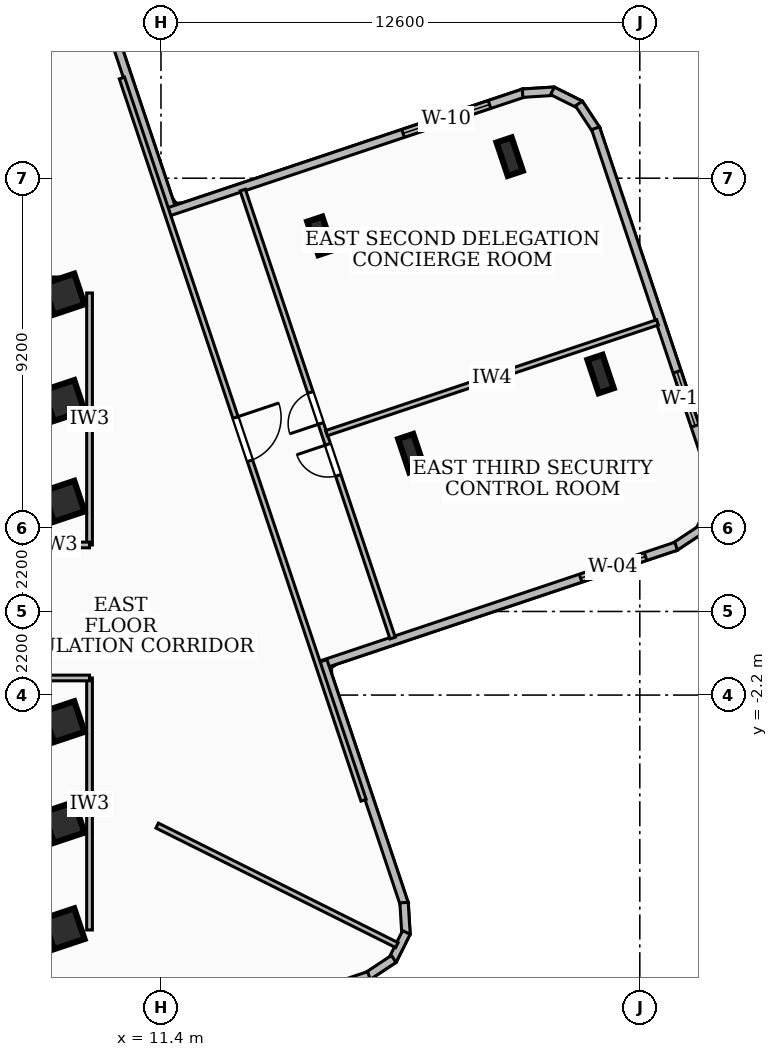
"""IFC4 building model, lengths in metres.
Left out: names, types, materials, properties, quantities, classifications, styles, units other than length and angle.
Written with IfcOpenShell. Run it as: python <this file> out.ifc"""

import sys

from ifc_helpers import new_model, si_unit, direction, frame, frame_2d, origin, origin_2d, place, context, subcontext, project, spatial, rectangle, i_section, extrude, element, fill, save


model = new_model("IFC4")
c1 = context("Model", 3, precision=1e-05, world=origin(), true_north=direction((0.0, 1.0)))
c2 = subcontext(c1, "Body", "Model", "MODEL_VIEW")
j1 = project(units=[si_unit("LENGTHUNIT", "METRE"), si_unit("PLANEANGLEUNIT", "RADIAN")], contexts=[c1])
p1 = place(None, origin())
s1 = spatial("IfcSite", under=j1, at=p1, CompositionType="ELEMENT")
p2 = place(p1, origin())
s2 = spatial("IfcBuilding", under=s1, at=p2, CompositionType="ELEMENT")
p3 = place(p2, frame((0.0, 0.0, 159.48)))
s3 = spatial("IfcBuildingStorey", under=s2, at=p3, CompositionType="ELEMENT", Elevation=159.48)
for number, where, z_axis, x_axis in (
    (1, (-8.78, 8.535, 0.0), (0.0, 0.0, 1.0), (1.0, 0.0, 0.0)),
    (2, (8.78, -8.535, 0.0), (0.0, 0.0, 1.0), (-1.0, 0.0, 0.0)),
):
    element("IfcWall", number, at=place(p3, frame(where, z_axis=z_axis, x_axis=x_axis)), inside=s3, PredefinedType="SHEAR", context=c2, shape_type="SweptSolid", body=[
        extrude(rectangle(XDim=17.56, YDim=0.45, at=frame_2d((8.78, 0.0))), origin(), (0.0, 0.0, 1.0), 3.34),
    ])
for number, where, z_axis, x_axis in (
    (3, (8.85, -5.55, 0.0), (0.0, 0.0, 1.0), (0.948, 0.317, 0.0)),
    (4, (8.85, -2.9, 0.0), (0.0, 0.0, 1.0), (0.948, 0.317, 0.0)),
    (5, (8.85, 2.9, 0.0), (0.0, 0.0, 1.0), (0.948, 0.317, 0.0)),
    (6, (8.85, 5.55, 0.0), (0.0, 0.0, 1.0), (0.948, 0.317, 0.0)),
    (7, (8.85, -8.35, 0.0), (0.0, 0.0, 1.0), (0.948, 0.317, 0.0)),
    (8, (8.85, 8.35, 0.0), (0.0, 0.0, 1.0), (0.948, 0.317, 0.0)),
):
    element("IfcColumn", number, at=place(p3, frame(where, z_axis=z_axis, x_axis=x_axis)), inside=s3, PredefinedType="COLUMN", context=c2, shape_type="SweptSolid", body=[
        extrude(rectangle(XDim=0.85, YDim=0.85, at=origin_2d()), origin(), (0.0, 0.0, 1.0), 3.6),
    ])
for number, where, z_axis, x_axis in (
    (9, (17.987, 4.164, 0.0), (0.0, 0.0, 1.0), (0.948, 0.317, 0.0)),
    (10, (15.594, 9.883, 0.0), (0.0, 0.0, 1.0), (0.948, 0.317, 0.0)),
    (11, (22.968, 6.248, 0.0), (0.0, 0.0, 1.0), (0.948, 0.317, 0.0)),
    (12, (20.576, 11.967, 0.0), (0.0, 0.0, 1.0), (0.948, 0.317, 0.0)),
):
    element("IfcColumn", number, at=place(p3, frame(where, z_axis=z_axis, x_axis=x_axis)), inside=s3, PredefinedType="COLUMN", context=c2, shape_type="SweptSolid", body=[
        extrude(i_section(OverallWidth=0.418, OverallDepth=0.927, WebThickness=0.019, FlangeThickness=0.032, at=origin_2d()), origin(), (0.0, 0.0, 1.0), 3.6),
    ])
p4 = place(p3, frame((9.581, 16.873, 0.0), z_axis=(0.0, 0.0, 1.0), x_axis=(0.317387116224, -0.94829606055, 0.0)))
e13 = element("IfcWall", 13, at=p4, inside=s3, PredefinedType="SOLIDWALL", context=c2, shape_type="SweptSolid", body=[
    extrude(rectangle(XDim=6.758, YDim=0.22, at=frame_2d((3.379, 0.0))), origin(), (0.0, 0.0, 1.0), 3.34),
])
p5 = place(p3, frame((11.615, 10.519, 0.0), z_axis=(0.0, 0.0, 1.0), x_axis=(0.948331055834, 0.317282537404, 0.0)))
e14 = element("IfcWall", 14, at=p5, inside=s3, PredefinedType="SOLIDWALL", context=c2, shape_type="SweptSolid", body=[
    extrude(rectangle(XDim=9.858, YDim=0.22, at=frame_2d((4.929, 0.0))), origin(), (0.0, 0.0, 1.0), 3.34),
])
p6 = place(p5, frame((6.49, 0.0, 0.85)))
e15 = element("IfcOpeningElement", 15, at=p6, cuts=e14, PredefinedType="OPENING", context=c2, shape_type="SweptSolid", body=[
    extrude(rectangle(XDim=2.4, YDim=1.65, at=frame_2d((1.2, 0.825))), frame((0.0, 0.12, 0.0), z_axis=(0.0, -1.0, 0.0), x_axis=(1.0, 0.0, 0.0)), (0.0, 0.0, 1.0), 0.24),
])
p7 = place(p3, frame((20.915, 13.637, 0.0), z_axis=(0.0, 0.0, 1.0), x_axis=(0.998057128569, 0.062305442082, 0.0)))
e16 = element("IfcWall", 16, at=p7, inside=s3, PredefinedType="SOLIDWALL", context=c2, shape_type="SweptSolid", body=[
    extrude(rectangle(XDim=0.835, YDim=0.22, at=frame_2d((0.417, 0.0))), origin(), (0.0, 0.0, 1.0), 3.34),
])
p8 = place(p3, frame((21.701, 13.698, 0.0), z_axis=(0.0, 0.0, 1.0), x_axis=(0.894963703084, -0.446138958356, 0.0)))
e17 = element("IfcWall", 17, at=p8, inside=s3, PredefinedType="SOLIDWALL", context=c2, shape_type="SweptSolid", body=[
    extrude(rectangle(XDim=0.818, YDim=0.22, at=frame_2d((0.409, 0.0))), origin(), (0.0, 0.0, 1.0), 3.34),
])
p9 = place(p3, frame((22.397, 13.365, 0.0), z_axis=(0.0, 0.0, 1.0), x_axis=(0.552133058206, -0.833756011094, 0.0)))
e18 = element("IfcWall", 18, at=p9, inside=s3, PredefinedType="SOLIDWALL", context=c2, shape_type="SweptSolid", body=[
    extrude(rectangle(XDim=0.835, YDim=0.22, at=frame_2d((0.417, 0.0))), origin(), (0.0, 0.0, 1.0), 3.34),
])
p10 = place(p3, frame((22.836, 12.714, 0.0), z_axis=(0.0, 0.0, 1.0), x_axis=(0.317285610931, -0.94833002752, 0.0)))
e19 = element("IfcWall", 19, at=p10, inside=s3, PredefinedType="SOLIDWALL", context=c2, shape_type="SweptSolid", body=[
    extrude(rectangle(XDim=9.622, YDim=0.22, at=frame_2d((4.811, 0.0))), origin(), (0.0, 0.0, 1.0), 3.34),
])
p11 = place(p10, frame((6.755, 0.0, 0.85)))
e20 = element("IfcOpeningElement", 20, at=p11, cuts=e19, PredefinedType="OPENING", context=c2, shape_type="SweptSolid", body=[
    extrude(rectangle(XDim=1.5, YDim=1.5, at=frame_2d((0.75, 0.75))), frame((0.0, 0.12, 0.0), z_axis=(0.0, -1.0, 0.0), x_axis=(1.0, 0.0, 0.0)), (0.0, 0.0, 1.0), 0.24),
])
p12 = place(p3, frame((25.94, 2.853, 0.0), z_axis=(0.0, 0.0, 1.0), x_axis=(-0.445781750405, -0.895141682085, 0.0)))
e21 = element("IfcWall", 21, at=p12, inside=s3, PredefinedType="SOLIDWALL", context=c2, shape_type="SweptSolid", body=[
    extrude(rectangle(XDim=0.819, YDim=0.22, at=frame_2d((0.409, 0.0))), origin(), (0.0, 0.0, 1.0), 3.34),
])
p13 = place(p3, frame((25.607, 2.156, 0.0), z_axis=(0.0, 0.0, 1.0), x_axis=(-0.833756011094, -0.552133058206, 0.0)))
e22 = element("IfcWall", 22, at=p13, inside=s3, PredefinedType="SOLIDWALL", context=c2, shape_type="SweptSolid", body=[
    extrude(rectangle(XDim=0.835, YDim=0.22, at=frame_2d((0.417, 0.0))), origin(), (0.0, 0.0, 1.0), 3.34),
])
p14 = place(p3, frame((24.956, 1.717, 0.0), z_axis=(0.0, 0.0, 1.0), x_axis=(-0.948331055834, -0.317282537404, 0.0)))
e23 = element("IfcWall", 23, at=p14, inside=s3, PredefinedType="SOLIDWALL", context=c2, shape_type="SweptSolid", body=[
    extrude(rectangle(XDim=9.858, YDim=0.22, at=frame_2d((4.929, 0.0))), origin(), (0.0, 0.0, 1.0), 3.34),
])
p15 = place(p14, frame((0.85, 0.0, 0.85)))
e24 = element("IfcOpeningElement", 24, at=p15, cuts=e23, PredefinedType="OPENING", context=c2, shape_type="SweptSolid", body=[
    extrude(rectangle(XDim=1.8, YDim=2.0, at=frame_2d((0.9, 1.0))), frame((0.0, 0.12, 0.0), z_axis=(0.0, -1.0, 0.0), x_axis=(1.0, 0.0, 0.0)), (0.0, 0.0, 1.0), 0.24),
])
p16 = place(p3, frame((15.662, -1.3, 0.0), z_axis=(0.0, 0.0, 1.0), x_axis=(0.317224676093, -0.948350412494, 0.0)))
e25 = element("IfcWall", 25, at=p16, inside=s3, PredefinedType="SOLIDWALL", context=c2, shape_type="SweptSolid", body=[
    extrude(rectangle(XDim=6.758, YDim=0.22, at=frame_2d((3.379, 0.0))), origin(), (0.0, 0.0, 1.0), 3.34),
])
p17 = place(p3, frame((17.796, -7.66, 0.0), z_axis=(0.0, 0.0, 1.0), x_axis=(0.062305442082, -0.998057128569, 0.0)))
e26 = element("IfcWall", 26, at=p17, inside=s3, PredefinedType="SOLIDWALL", context=c2, shape_type="SweptSolid", body=[
    extrude(rectangle(XDim=0.835, YDim=0.22, at=frame_2d((0.417, 0.0))), origin(), (0.0, 0.0, 1.0), 3.34),
])
p18 = place(p3, frame((17.857, -8.446, 0.0), z_axis=(0.0, 0.0, 1.0), x_axis=(-0.446258139106, -0.894904281631, 0.0)))
e27 = element("IfcWall", 27, at=p18, inside=s3, PredefinedType="SOLIDWALL", context=c2, shape_type="SweptSolid", body=[
    extrude(rectangle(XDim=0.818, YDim=0.22, at=frame_2d((0.409, 0.0))), origin(), (0.0, 0.0, 1.0), 3.34),
])
p19 = place(p3, frame((17.524, -9.142, 0.0), z_axis=(0.0, 0.0, 1.0), x_axis=(-0.833756011094, -0.552133058206, 0.0)))
e28 = element("IfcWall", 28, at=p19, inside=s3, PredefinedType="SOLIDWALL", context=c2, shape_type="SweptSolid", body=[
    extrude(rectangle(XDim=0.835, YDim=0.22, at=frame_2d((0.417, 0.0))), origin(), (0.0, 0.0, 1.0), 3.34),
])
p20 = place(p3, frame((16.873, -9.581, 0.0), z_axis=(0.0, 0.0, 1.0), x_axis=(-0.94829606055, -0.317387116224, 0.0)))
e29 = element("IfcWall", 29, at=p20, inside=s3, PredefinedType="SOLIDWALL", context=c2, shape_type="SweptSolid", body=[
    extrude(rectangle(XDim=6.758, YDim=0.22, at=frame_2d((3.379, 0.0))), origin(), (0.0, 0.0, 1.0), 3.34),
])
p21 = place(p3, frame((9.52, 1.75, 0.0), z_axis=(0.0, 0.0, 1.0), x_axis=(0.0, 1.0, 0.0)))
e30 = element("IfcWall", 30, at=p21, inside=s3, PredefinedType="PARTITIONING", context=c2, shape_type="SweptSolid", body=[
    extrude(rectangle(XDim=6.63, YDim=0.15, at=frame_2d((3.315, 0.0))), origin(), (0.0, 0.0, 1.0), 2.644),
])
p22 = place(p3, frame((7.85, 1.75, 0.0), z_axis=(0.0, 0.0, 1.0), x_axis=(1.0, 0.0, 0.0)))
e31 = element("IfcWall", 31, at=p22, inside=s3, PredefinedType="PARTITIONING", context=c2, shape_type="SweptSolid", body=[
    extrude(rectangle(XDim=1.67, YDim=0.15, at=frame_2d((0.835, 0.0))), origin(), (0.0, 0.0, 1.0), 2.57),
])
p23 = place(p3, frame((9.52, -8.38, 0.0), z_axis=(0.0, 0.0, 1.0), x_axis=(0.0, 1.0, 0.0)))
e32 = element("IfcWall", 32, at=p23, inside=s3, PredefinedType="PARTITIONING", context=c2, shape_type="SweptSolid", body=[
    extrude(rectangle(XDim=6.63, YDim=0.15, at=frame_2d((3.315, 0.0))), origin(), (0.0, 0.0, 1.0), 3.34),
])
p24 = place(p3, frame((7.85, -1.75, 0.0), z_axis=(0.0, 0.0, 1.0), x_axis=(1.0, 0.0, 0.0)))
e33 = element("IfcWall", 33, at=p24, inside=s3, PredefinedType="PARTITIONING", context=c2, shape_type="SweptSolid", body=[
    extrude(rectangle(XDim=1.67, YDim=0.15, at=frame_2d((0.835, 0.0))), origin(), (0.0, 0.0, 1.0), 2.57),
])
p25 = place(p3, frame((5.176, 10.38, 0.0), z_axis=(0.0, 0.0, 1.0), x_axis=(0.446173290391, 0.894946587759, 0.0)))
e34 = element("IfcWall", 34, at=p25, inside=s3, PredefinedType="PARTITIONING", context=c2, shape_type="SweptSolid", body=[
    extrude(rectangle(XDim=8.075, YDim=0.145, at=frame_2d((4.038, 0.0))), origin(), (0.0, 0.0, 1.0), 3.34),
])
p26 = place(p3, frame((11.3, -5.634, 0.0), z_axis=(0.0, 0.0, 1.0), x_axis=(0.894904738475, -0.446257222972, 0.0)))
e35 = element("IfcWall", 35, at=p26, inside=s3, PredefinedType="PARTITIONING", context=c2, shape_type="SweptSolid", body=[
    extrude(rectangle(XDim=7.048, YDim=0.145, at=frame_2d((3.524, 0.0))), origin(), (0.0, 0.0, 1.0), 3.34),
])
p27 = place(p3, frame((10.372, 14.037, 0.0), z_axis=(0.0, 0.0, 1.0), x_axis=(0.317298382655, -0.94832575435, 0.0)))
e36 = element("IfcWall", 36, at=p27, inside=s3, PredefinedType="PARTITIONING", context=c2, shape_type="SweptSolid", body=[
    extrude(rectangle(XDim=20.041, YDim=0.145, at=frame_2d((10.021, 0.0))), origin(), (0.0, 0.0, 1.0), 2.644),
])
p28 = place(p27, frame((9.42, 0.0, 0.0)))
e37 = element("IfcOpeningElement", 37, at=p28, cuts=e36, PredefinedType="OPENING", context=c2, shape_type="SweptSolid", body=[
    extrude(rectangle(XDim=1.2, YDim=2.1, at=frame_2d((0.6, 1.05))), frame((0.0, 0.083, 0.0), z_axis=(0.0, -1.0, 0.0), x_axis=(1.0, 0.0, 0.0)), (0.0, 0.0, 1.0), 0.165),
])
p29 = place(p3, frame((15.755, 4.692, 0.0), z_axis=(0.0, 0.0, 1.0), x_axis=(0.94831322287, 0.317335833667, 0.0)))
e38 = element("IfcWall", 38, at=p29, inside=s3, PredefinedType="PARTITIONING", context=c2, shape_type="SweptSolid", body=[
    extrude(rectangle(XDim=9.186, YDim=0.145, at=frame_2d((4.593, 0.0))), origin(), (0.0, 0.0, 1.0), 2.793),
])
p30 = place(p3, frame((17.496, -0.7, 0.0), z_axis=(0.0, 0.0, 1.0), x_axis=(-0.317299961245, 0.948325226172, 0.0)))
e39 = element("IfcWall", 39, at=p30, inside=s3, PredefinedType="PARTITIONING", context=c2, shape_type="SweptSolid", body=[
    extrude(rectangle(XDim=12.43, YDim=0.145, at=frame_2d((6.215, 0.0))), origin(), (0.0, 0.0, 1.0), 2.644),
])
p31 = place(p30, frame((4.515, 0.0, 0.0)))
e40 = element("IfcOpeningElement", 40, at=p31, cuts=e39, PredefinedType="OPENING", context=c2, shape_type="SweptSolid", body=[
    extrude(rectangle(XDim=0.86, YDim=2.04, at=frame_2d((0.43, 1.02))), frame((0.0, 0.083, 0.0), z_axis=(0.0, -1.0, 0.0), x_axis=(1.0, 0.0, 0.0)), (0.0, 0.0, 1.0), 0.165),
])
p32 = place(p30, frame((5.955, 0.0, 0.0)))
e41 = element("IfcOpeningElement", 41, at=p32, cuts=e39, PredefinedType="OPENING", context=c2, shape_type="SweptSolid", body=[
    extrude(rectangle(XDim=0.86, YDim=2.04, at=frame_2d((0.43, 1.02))), frame((0.0, 0.083, 0.0), z_axis=(0.0, -1.0, 0.0), x_axis=(1.0, 0.0, 0.0)), (0.0, 0.0, 1.0), 0.165),
])
p33 = place(p6, origin())
e42 = element("IfcWindow", 42, at=p33, inside=s3, PartitioningType="SINGLE_PANEL", PredefinedType="WINDOW", context=c2, shape_type="SweptSolid", body=[
    extrude(rectangle(XDim=2.4, YDim=1.65, at=frame_2d((1.2, 0.825))), frame((0.0, 0.03, 0.0), z_axis=(0.0, -1.0, 0.0), x_axis=(1.0, 0.0, 0.0)), (0.0, 0.0, 1.0), 0.06),
])
fill(e15, e42)
p34 = place(p11, origin())
e43 = element("IfcWindow", 43, at=p34, inside=s3, PartitioningType="SINGLE_PANEL", PredefinedType="WINDOW", context=c2, shape_type="SweptSolid", body=[
    extrude(rectangle(XDim=1.5, YDim=1.5, at=frame_2d((0.75, 0.75))), frame((0.0, 0.03, 0.0), z_axis=(0.0, -1.0, 0.0), x_axis=(1.0, 0.0, 0.0)), (0.0, 0.0, 1.0), 0.06),
])
fill(e20, e43)
p35 = place(p15, origin())
e44 = element("IfcWindow", 44, at=p35, inside=s3, PartitioningType="SINGLE_PANEL", PredefinedType="WINDOW", context=c2, shape_type="SweptSolid", body=[
    extrude(rectangle(XDim=1.8, YDim=2.0, at=frame_2d((0.9, 1.0))), frame((0.0, 0.03, 0.0), z_axis=(0.0, -1.0, 0.0), x_axis=(1.0, 0.0, 0.0)), (0.0, 0.0, 1.0), 0.06),
])
fill(e24, e44)
p36 = place(p28, origin())
e45 = element("IfcDoor", 45, at=p36, inside=s3, OperationType="SINGLE_SWING_LEFT", PredefinedType="DOOR", context=c2, shape_type="SweptSolid", body=[
    extrude(rectangle(XDim=1.2, YDim=2.1, at=frame_2d((0.6, 1.05))), frame((0.0, 0.025, 0.0), z_axis=(0.0, -1.0, 0.0), x_axis=(1.0, 0.0, 0.0)), (0.0, 0.0, 1.0), 0.05),
])
fill(e37, e45)
p37 = place(p31, origin())
e46 = element("IfcDoor", 46, at=p37, inside=s3, OperationType="SINGLE_SWING_RIGHT", PredefinedType="DOOR", context=c2, shape_type="SweptSolid", body=[
    extrude(rectangle(XDim=0.86, YDim=2.04, at=frame_2d((0.43, 1.02))), frame((0.0, 0.025, 0.0), z_axis=(0.0, -1.0, 0.0), x_axis=(1.0, 0.0, 0.0)), (0.0, 0.0, 1.0), 0.05),
])
fill(e40, e46)
p38 = place(p32, origin())
e47 = element("IfcDoor", 47, at=p38, inside=s3, OperationType="SINGLE_SWING_LEFT", PredefinedType="DOOR", context=c2, shape_type="SweptSolid", body=[
    extrude(rectangle(XDim=0.86, YDim=2.04, at=frame_2d((0.43, 1.02))), frame((0.0, 0.025, 0.0), z_axis=(0.0, -1.0, 0.0), x_axis=(1.0, 0.0, 0.0)), (0.0, 0.0, 1.0), 0.05),
])
fill(e41, e47)
save(model, sys.argv[1])
